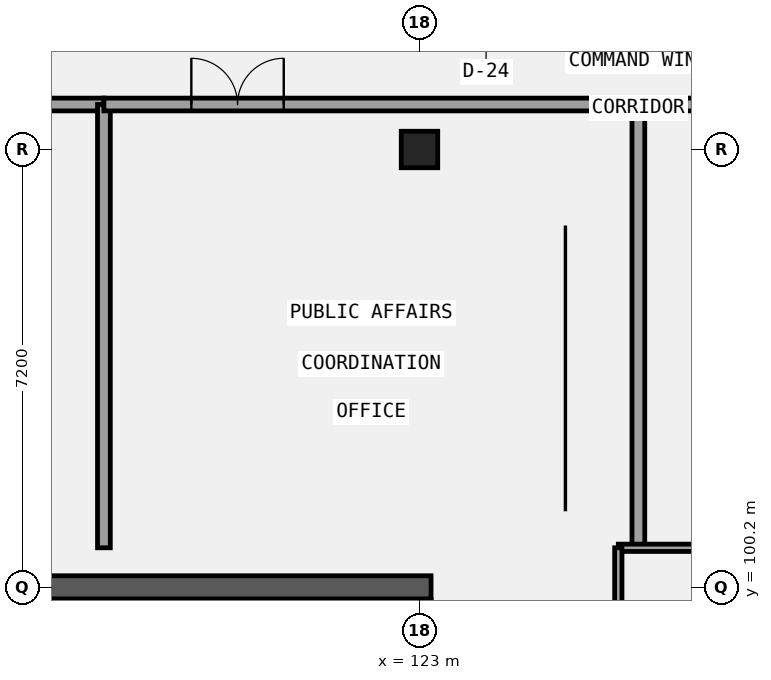
"""IFC4 building model, lengths in metres.
Left out: names, types, materials, properties, quantities, classifications, styles, units other than length and angle.
Written with IfcOpenShell. Run it as: python <this file> out.ifc"""

import sys

from ifc_helpers import new_model, si_unit, direction, frame, frame_2d, origin, origin_2d, place, context, subcontext, project, spatial, rectangle, extrude, element, fill, save


model = new_model("IFC4")
c1 = context("Model", 3, precision=1e-05, world=origin(), true_north=direction((0.0, 1.0)))
c2 = subcontext(c1, "Body", "Model", "MODEL_VIEW")
j1 = project(units=[si_unit("LENGTHUNIT", "METRE"), si_unit("PLANEANGLEUNIT", "RADIAN")], contexts=[c1])
p1 = place(None, origin())
s1 = spatial("IfcSite", under=j1, at=p1, CompositionType="ELEMENT")
p2 = place(p1, origin())
s2 = spatial("IfcBuilding", under=s1, at=p2, CompositionType="ELEMENT")
p3 = place(p2, frame((0.0, 0.0, 9.6)))
s3 = spatial("IfcBuildingStorey", under=s2, at=p3, CompositionType="ELEMENT", Elevation=9.6)
p4 = place(p3, frame((108.41, 100.2, 0.0), z_axis=(0.0, 0.0, 1.0), x_axis=(1.0, 0.0, 0.0)))
e1 = element("IfcWall", 1, at=p4, inside=s3, PredefinedType="SHEAR", context=c2, shape_type="SweptSolid", body=[
    extrude(rectangle(XDim=14.78, YDim=0.38, at=frame_2d((7.39, 0.0))), origin(), (0.0, 0.0, 1.0), 4.2),
])
p5 = place(p3, frame((123.0, 93.2, 0.0), z_axis=(0.0, 0.0, 1.0), x_axis=(0.0, 1.0, 0.0)))
e2 = element("IfcWall", 2, at=p5, inside=s3, PredefinedType="SHEAR", context=c2, shape_type="SweptSolid", body=[
    extrude(rectangle(XDim=6.8, YDim=0.38, at=frame_2d((3.4, 0.0))), origin(), (0.0, 0.0, 1.0), 4.2),
])
for number, where, z_axis, x_axis in (
    (3, (118.5, 96.82, 0.0), (0.0, 0.0, 1.0), (0.0, 1.0, 0.0)),
    (4, (120.42, 96.82, 0.0), (0.0, 0.0, 1.0), (0.0, 1.0, 0.0)),
    (5, (122.34, 96.82, 0.0), (0.0, 0.0, 1.0), (0.0, 1.0, 0.0)),
):
    element("IfcWall", number, at=place(p3, frame(where, z_axis=z_axis, x_axis=x_axis)), inside=s3, PredefinedType="SHEAR", context=c2, shape_type="SweptSolid", body=[
        extrude(rectangle(XDim=3.18, YDim=0.38, at=frame_2d((1.59, 0.0))), origin(), (0.0, 0.0, 1.0), 4.2),
    ])
p6 = place(p3, frame((123.0, 107.4, 0.0), z_axis=(0.0, 0.0, 1.0), x_axis=(1.0, 0.0, 0.0)))
e6 = element("IfcColumn", 6, at=p6, inside=s3, PredefinedType="COLUMN", context=c2, shape_type="SweptSolid", body=[
    extrude(rectangle(XDim=0.6, YDim=0.6, at=origin_2d()), origin(), (0.0, 0.0, 1.0), 4.2),
])
p7 = place(p3, frame((109.02, 108.14, 0.0), z_axis=(0.0, 0.0, 1.0), x_axis=(1.0, 0.0, 0.0)))
e7 = element("IfcWall", 7, at=p7, inside=s3, PredefinedType="PARTITIONING", context=c2, shape_type="SweptSolid", body=[
    extrude(rectangle(XDim=8.79, YDim=0.21, at=frame_2d((4.395, 0.0))), origin(), (0.0, 0.0, 1.0), 3.94),
])
p8 = place(p7, frame((3.715, 0.0, 0.0)))
e8 = element("IfcOpeningElement", 8, at=p8, cuts=e7, PredefinedType="OPENING", context=c2, shape_type="SweptSolid", body=[
    extrude(rectangle(XDim=1.36, YDim=2.35, at=frame_2d((0.68, 1.175))), frame((0.0, 0.115, 0.0), z_axis=(0.0, -1.0, 0.0), x_axis=(1.0, 0.0, 0.0)), (0.0, 0.0, 1.0), 0.23),
])
p9 = place(p3, frame((117.81, 100.85, 0.0), z_axis=(0.0, 0.0, 1.0), x_axis=(0.0, 1.0, 0.0)))
e9 = element("IfcWall", 9, at=p9, inside=s3, PredefinedType="PARTITIONING", context=c2, shape_type="SweptSolid", body=[
    extrude(rectangle(XDim=7.29, YDim=0.21, at=frame_2d((3.645, 0.0))), origin(), (0.0, 0.0, 1.0), 3.94),
])
p10 = place(p3, frame((117.81, 108.14, 0.0), z_axis=(0.0, 0.0, 1.0), x_axis=(1.0, 0.0, 0.0)))
e10 = element("IfcWall", 10, at=p10, inside=s3, PredefinedType="PARTITIONING", context=c2, shape_type="SweptSolid", body=[
    extrude(rectangle(XDim=8.79, YDim=0.21, at=frame_2d((4.395, 0.0))), origin(), (0.0, 0.0, 1.0), 3.94),
])
p11 = place(p10, frame((1.438, 0.0, 0.0)))
e11 = element("IfcOpeningElement", 11, at=p11, cuts=e10, PredefinedType="OPENING", context=c2, shape_type="SweptSolid", body=[
    extrude(rectangle(XDim=1.52, YDim=2.1, at=frame_2d((0.76, 1.05))), frame((0.0, 0.115, 0.0), z_axis=(0.0, -1.0, 0.0), x_axis=(1.0, 0.0, 0.0)), (0.0, 0.0, 1.0), 0.23),
])
p12 = place(p3, frame((126.6, 100.85, 0.0), z_axis=(0.0, 0.0, 1.0), x_axis=(0.0, 1.0, 0.0)))
e12 = element("IfcWall", 12, at=p12, inside=s3, PredefinedType="PARTITIONING", context=c2, shape_type="SweptSolid", body=[
    extrude(rectangle(XDim=7.29, YDim=0.21, at=frame_2d((3.645, 0.0))), origin(), (0.0, 0.0, 1.0), 3.94),
])
p13 = place(p3, frame((126.6, 108.14, 0.0), z_axis=(0.0, 0.0, 1.0), x_axis=(1.0, 0.0, 0.0)))
e13 = element("IfcWall", 13, at=p13, inside=s3, PredefinedType="PARTITIONING", context=c2, shape_type="SweptSolid", body=[
    extrude(rectangle(XDim=8.79, YDim=0.21, at=frame_2d((4.395, 0.0))), origin(), (0.0, 0.0, 1.0), 3.94),
])
p14 = place(p13, frame((5.833, 0.0, 0.0)))
e14 = element("IfcOpeningElement", 14, at=p14, cuts=e13, PredefinedType="OPENING", context=c2, shape_type="SweptSolid", body=[
    extrude(rectangle(XDim=1.52, YDim=2.22, at=frame_2d((0.76, 1.11))), frame((0.0, 0.115, 0.0), z_axis=(0.0, -1.0, 0.0), x_axis=(1.0, 0.0, 0.0)), (0.0, 0.0, 1.0), 0.23),
])
p15 = place(p3, frame((126.27, 100.85, 0.0), z_axis=(0.0, 0.0, 1.0), x_axis=(1.0, 0.0, 0.0)))
e15 = element("IfcWall", 15, at=p15, inside=s3, PredefinedType="PARTITIONING", context=c2, shape_type="SweptSolid", body=[
    extrude(rectangle(XDim=3.28, YDim=0.12, at=frame_2d((1.64, 0.0))), origin(), (0.0, 0.0, 1.0), 3.94),
])
p16 = place(p3, frame((126.27, 95.425, 0.0), z_axis=(0.0, 0.0, 1.0), x_axis=(0.0, 1.0, 0.0)))
e16 = element("IfcWall", 16, at=p16, inside=s3, PredefinedType="PARTITIONING", context=c2, shape_type="SweptSolid", body=[
    extrude(rectangle(XDim=5.425, YDim=0.12, at=frame_2d((2.712, 0.0))), origin(), (0.0, 0.0, 1.0), 3.94),
])
p17 = place(p16, frame((2.163, 0.0, 0.0)))
e17 = element("IfcOpeningElement", 17, at=p17, cuts=e16, PredefinedType="OPENING", context=c2, shape_type="SweptSolid", body=[
    extrude(rectangle(XDim=1.1, YDim=2.22, at=frame_2d((0.55, 1.11))), frame((0.0, 0.07, 0.0), z_axis=(0.0, -1.0, 0.0), x_axis=(1.0, 0.0, 0.0)), (0.0, 0.0, 1.0), 0.14),
])
p18 = place(p11, frame((1.52, 0.0, 0.0), z_axis=(0.0, 0.0, 1.0), x_axis=(-1.0, 0.0, 0.0)))
e18 = element("IfcDoor", 18, at=p18, inside=s3, OperationType="DOUBLE_DOOR_SINGLE_SWING", PredefinedType="DOOR", context=c2, shape_type="SweptSolid", body=[
    extrude(rectangle(XDim=1.52, YDim=2.1, at=frame_2d((0.76, 1.05))), frame((0.0, 0.025, 0.0), z_axis=(0.0, -1.0, 0.0), x_axis=(1.0, 0.0, 0.0)), (0.0, 0.0, 1.0), 0.05),
])
fill(e11, e18)
save(model, sys.argv[1])
